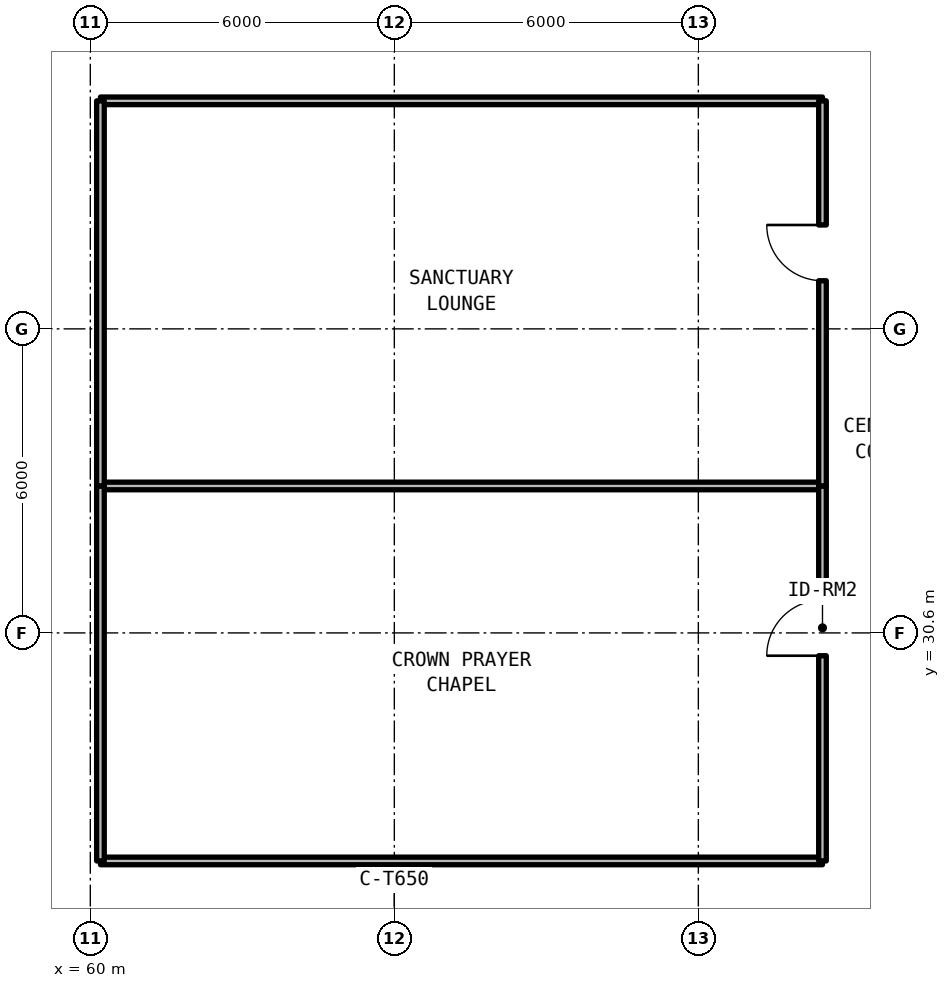
"""IFC4 building model, lengths in metres.
Left out: names, types, materials, properties, quantities, classifications, styles, units other than length and angle.
Written with IfcOpenShell. Run it as: python <this file> out.ifc"""

import sys

from ifc_helpers import new_model, si_unit, direction, frame, frame_2d, origin, place, context, subcontext, project, spatial, rectangle, extrude, element, fill, save


model = new_model("IFC4")
c1 = context("Model", 3, precision=1e-05, world=origin(), true_north=direction((0.0, 1.0)))
c2 = subcontext(c1, "Body", "Model", "MODEL_VIEW")
j1 = project(units=[si_unit("LENGTHUNIT", "METRE"), si_unit("PLANEANGLEUNIT", "RADIAN")], contexts=[c1])
p1 = place(None, origin())
s1 = spatial("IfcSite", under=j1, at=p1, CompositionType="ELEMENT")
p2 = place(p1, origin())
s2 = spatial("IfcBuilding", under=s1, at=p2, CompositionType="ELEMENT")
p3 = place(p2, frame((0.0, 0.0, 242.55)))
s3 = spatial("IfcBuildingStorey", under=s2, at=p3, CompositionType="ELEMENT", Elevation=242.55)
for number, where, z_axis, x_axis in (
    (1, (60.2, 26.1, 0.0), (0.0, 0.0, 1.0), (1.0, 0.0, 0.0)),
    (2, (60.2, 33.5, 0.0), (0.0, 0.0, 1.0), (1.0, 0.0, 0.0)),
):
    element("IfcWall", number, at=place(p3, frame(where, z_axis=z_axis, x_axis=x_axis)), inside=s3, PredefinedType="SOLIDWALL", context=c2, shape_type="SweptSolid", body=[
        extrude(rectangle(XDim=14.25, YDim=0.15, at=frame_2d((7.125, 0.0))), origin(), (0.0, 0.0, 1.0), 2.63),
    ])
p4 = place(p3, frame((60.2, 26.1, 0.0), z_axis=(0.0, 0.0, 1.0), x_axis=(0.0, 1.0, 0.0)))
e3 = element("IfcWall", 3, at=p4, inside=s3, PredefinedType="SOLIDWALL", context=c2, shape_type="SweptSolid", body=[
    extrude(rectangle(XDim=7.4, YDim=0.15, at=frame_2d((3.7, 0.0))), origin(), (0.0, 0.0, 1.0), 2.63),
])
p5 = place(p3, frame((74.45, 26.1, 0.0), z_axis=(0.0, 0.0, 1.0), x_axis=(0.0, 1.0, 0.0)))
e4 = element("IfcWall", 4, at=p5, inside=s3, PredefinedType="SOLIDWALL", context=c2, shape_type="SweptSolid", body=[
    extrude(rectangle(XDim=7.4, YDim=0.15, at=frame_2d((3.7, 0.0))), origin(), (0.0, 0.0, 1.0), 2.63),
])
p6 = place(p5, frame((4.05, 0.0, 0.0)))
e5 = element("IfcOpeningElement", 5, at=p6, cuts=e4, PredefinedType="OPENING", context=c2, shape_type="SweptSolid", body=[
    extrude(rectangle(XDim=1.1, YDim=2.15, at=frame_2d((0.55, 1.075))), frame((0.0, 0.085, 0.0), z_axis=(0.0, -1.0, 0.0), x_axis=(1.0, 0.0, 0.0)), (0.0, 0.0, 1.0), 0.17),
])
p7 = place(p3, frame((60.2, 41.1, 0.0), z_axis=(0.0, 0.0, 1.0), x_axis=(1.0, 0.0, 0.0)))
e6 = element("IfcWall", 6, at=p7, inside=s3, PredefinedType="SOLIDWALL", context=c2, shape_type="SweptSolid", body=[
    extrude(rectangle(XDim=14.25, YDim=0.15, at=frame_2d((7.125, 0.0))), origin(), (0.0, 0.0, 1.0), 2.63),
])
p8 = place(p3, frame((60.2, 33.5, 0.0), z_axis=(0.0, 0.0, 1.0), x_axis=(0.0, 1.0, 0.0)))
e7 = element("IfcWall", 7, at=p8, inside=s3, PredefinedType="SOLIDWALL", context=c2, shape_type="SweptSolid", body=[
    extrude(rectangle(XDim=7.6, YDim=0.15, at=frame_2d((3.8, 0.0))), origin(), (0.0, 0.0, 1.0), 2.63),
])
p9 = place(p3, frame((74.45, 33.5, 0.0), z_axis=(0.0, 0.0, 1.0), x_axis=(0.0, 1.0, 0.0)))
e8 = element("IfcWall", 8, at=p9, inside=s3, PredefinedType="SOLIDWALL", context=c2, shape_type="SweptSolid", body=[
    extrude(rectangle(XDim=7.6, YDim=0.15, at=frame_2d((3.8, 0.0))), origin(), (0.0, 0.0, 1.0), 2.63),
])
p10 = place(p9, frame((4.05, 0.0, 0.0)))
e9 = element("IfcOpeningElement", 9, at=p10, cuts=e8, PredefinedType="OPENING", context=c2, shape_type="SweptSolid", body=[
    extrude(rectangle(XDim=1.1, YDim=2.15, at=frame_2d((0.55, 1.075))), frame((0.0, 0.085, 0.0), z_axis=(0.0, -1.0, 0.0), x_axis=(1.0, 0.0, 0.0)), (0.0, 0.0, 1.0), 0.17),
])
p11 = place(p6, origin())
e10 = element("IfcDoor", 10, at=p11, inside=s3, OperationType="SINGLE_SWING_LEFT", PredefinedType="DOOR", context=c2, shape_type="SweptSolid", body=[
    extrude(rectangle(XDim=1.1, YDim=2.15, at=frame_2d((0.55, 1.075))), frame((0.0, 0.025, 0.0), z_axis=(0.0, -1.0, 0.0), x_axis=(1.0, 0.0, 0.0)), (0.0, 0.0, 1.0), 0.05),
])
fill(e5, e10)
p12 = place(p10, origin())
e11 = element("IfcDoor", 11, at=p12, inside=s3, OperationType="SINGLE_SWING_RIGHT", PredefinedType="DOOR", context=c2, shape_type="SweptSolid", body=[
    extrude(rectangle(XDim=1.1, YDim=2.15, at=frame_2d((0.55, 1.075))), frame((0.0, 0.025, 0.0), z_axis=(0.0, -1.0, 0.0), x_axis=(1.0, 0.0, 0.0)), (0.0, 0.0, 1.0), 0.05),
])
fill(e9, e11)
save(model, sys.argv[1])
